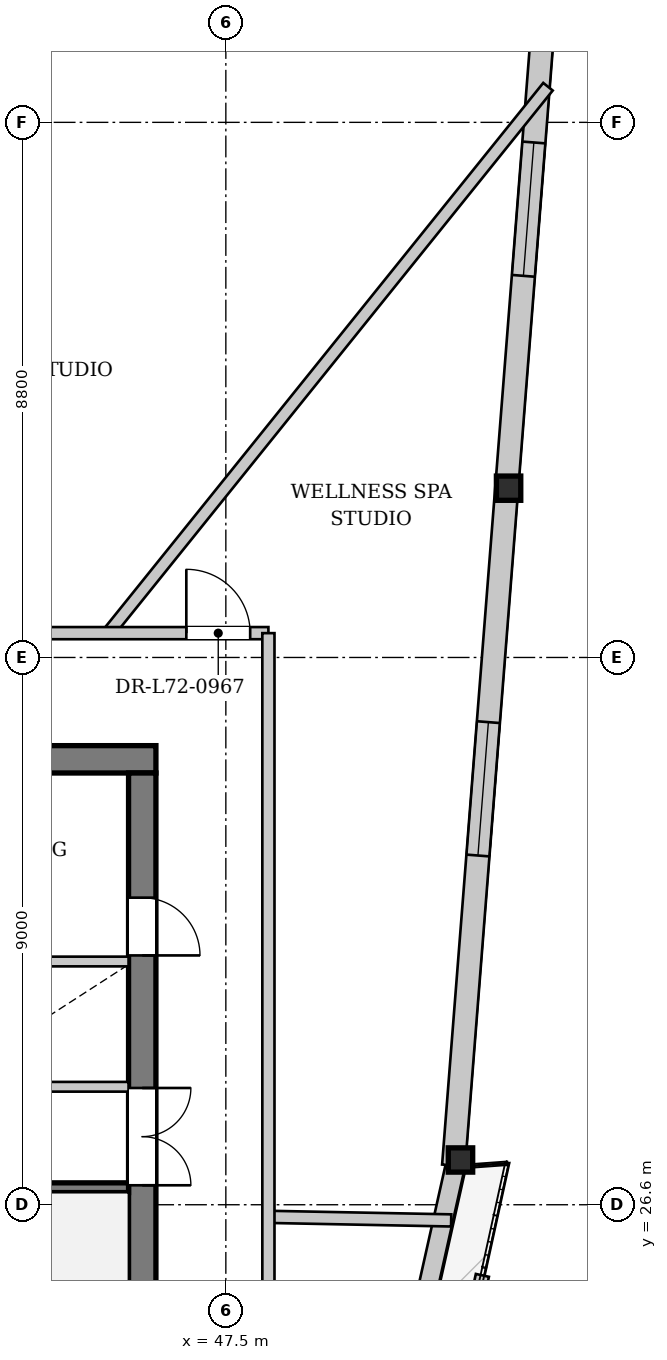
"""IFC4 building model, lengths in metres.
Left out: names, types, materials, properties, quantities, classifications, styles, units other than length and angle.
Written with IfcOpenShell. Run it as: python <this file> out.ifc"""

import sys

from ifc_helpers import new_model, si_unit, direction, frame, frame_2d, origin, origin_2d, place, context, subcontext, project, spatial, rectangle, i_section, extrude, source, transform, mapped, element, fill, save


model = new_model("IFC4")
c1 = context("Model", 3, precision=1e-05, world=origin(), true_north=direction((0.0, 1.0)))
c2 = subcontext(c1, "Body", "Model", "MODEL_VIEW")
j1 = project(units=[si_unit("LENGTHUNIT", "METRE"), si_unit("PLANEANGLEUNIT", "RADIAN")], contexts=[c1])
p1 = place(None, origin())
s1 = spatial("IfcSite", under=j1, at=p1, CompositionType="ELEMENT")
p2 = place(p1, origin())
s2 = spatial("IfcBuilding", under=s1, at=p2, CompositionType="ELEMENT")
p3 = place(p2, frame((0.0, 0.0, 270.5)))
s3 = spatial("IfcBuildingStorey", under=s2, at=p3, CompositionType="ELEMENT", Elevation=270.5)
m1 = source(origin(), c2, "Body", "SweptSolid", [
    extrude(i_section(OverallWidth=0.401, OverallDepth=0.399, WebThickness=0.022, FlangeThickness=0.034, at=origin_2d()), origin(), (0.0, 0.0, 1.0), 3.445),
])
p4 = place(p3, frame((51.436, 27.231, 0.0), z_axis=(-0.044436144626, 0.060878226848, 0.997155589939), x_axis=(-0.807718335097, -0.589568563569, 0.0)))
e1 = element("IfcColumn", 1, at=p4, inside=s3, PredefinedType="COLUMN", context=c2, shape_type="MappedRepresentation", body=[
    mapped(m1, transform((0.0, 0.0, 0.0), x_axis=(1.0, 0.0, 0.0), y_axis=(0.0, 1.0, 0.0), z_axis=(0.0, 0.0, 1.0), scale=1.0)),
])
m2 = source(origin(), c2, "Body", "SweptSolid", [
    extrude(i_section(OverallWidth=0.401, OverallDepth=0.399, WebThickness=0.022, FlangeThickness=0.034, at=origin_2d()), origin(), (0.0, 0.0, 1.0), 3.454),
])
p5 = place(p3, frame((52.303, 38.291, 0.0), z_axis=(-0.088644016049, 0.05407709113, 0.994594342752), x_axis=(-0.520788970814, -0.853685450197, 0.0)))
e2 = element("IfcColumn", 2, at=p5, inside=s3, PredefinedType="COLUMN", context=c2, shape_type="MappedRepresentation", body=[
    mapped(m2, transform((0.0, 0.0, 0.0), x_axis=(1.0, 0.0, 0.0), y_axis=(0.0, 1.0, 0.0), z_axis=(0.0, 0.0, 1.0), scale=1.0)),
])
p6 = place(p3, frame((51.28, 27.266, 0.0), z_axis=(0.0, 0.0, 1.0), x_axis=(-0.218426207381, -0.975853468472, 0.0)))
e3 = element("IfcWall", 3, at=p6, inside=s3, PredefinedType="SOLIDWALL", context=c2, shape_type="SweptSolid", body=[
    extrude(rectangle(XDim=22.187, YDim=0.32, at=frame_2d((11.093, 0.0))), origin(), (0.0, 0.0, 1.0), 2.872),
])
p7 = place(p6, frame((6.35, 0.0, 0.0)))
e4 = element("IfcOpeningElement", 4, at=p7, cuts=e3, PredefinedType="OPENING", context=c2, shape_type="SweptSolid", body=[
    extrude(rectangle(XDim=1.5, YDim=2.3, at=frame_2d((0.75, 1.15))), frame((0.0, 0.17, 0.0), z_axis=(0.0, -1.0, 0.0), x_axis=(1.0, 0.0, 0.0)), (0.0, 0.0, 1.0), 0.34),
])
p8 = place(p6, frame((15.568, 0.0, 0.402)))
e5 = element("IfcOpeningElement", 5, at=p8, cuts=e3, PredefinedType="OPENING", context=c2, shape_type="SweptSolid", body=[
    extrude(rectangle(XDim=2.6, YDim=2.35, at=frame_2d((1.3, 1.175))), frame((0.0, 0.17, 0.0), z_axis=(0.0, -1.0, 0.0), x_axis=(1.0, 0.0, 0.0)), (0.0, 0.0, 1.0), 0.34),
])
p9 = place(p3, frame((33.057, 39.294, 0.0), z_axis=(0.0, 0.0, 1.0), x_axis=(0.866967626838, 0.49836445902, 0.0)))
e6 = element("IfcWall", 6, at=p9, inside=s3, PredefinedType="SOLIDWALL", context=c2, shape_type="SweptSolid", body=[
    extrude(rectangle(XDim=21.674, YDim=0.32, at=frame_2d((10.837, 0.0))), origin(), (0.0, 0.0, 1.0), 2.872),
])
p10 = place(p9, frame((6.186, 0.0, 0.0)))
e7 = element("IfcOpeningElement", 7, at=p10, cuts=e6, PredefinedType="OPENING", context=c2, shape_type="SweptSolid", body=[
    extrude(rectangle(XDim=1.5, YDim=2.3, at=frame_2d((0.75, 1.15))), frame((0.0, 0.17, 0.0), z_axis=(0.0, -1.0, 0.0), x_axis=(1.0, 0.0, 0.0)), (0.0, 0.0, 1.0), 0.34),
])
p11 = place(p9, frame((14.739, 0.0, 0.402)))
e8 = element("IfcOpeningElement", 8, at=p11, cuts=e6, PredefinedType="OPENING", context=c2, shape_type="SweptSolid", body=[
    extrude(rectangle(XDim=2.6, YDim=2.35, at=frame_2d((1.3, 1.175))), frame((0.0, 0.17, 0.0), z_axis=(0.0, -1.0, 0.0), x_axis=(1.0, 0.0, 0.0)), (0.0, 0.0, 1.0), 0.34),
])
p12 = place(p3, frame((52.981, 49.365, 0.0), z_axis=(0.0, 0.0, 1.0), x_axis=(-0.078193389746, -0.99693820962, 0.0)))
e9 = element("IfcWall", 9, at=p12, inside=s3, PredefinedType="SOLIDWALL", context=c2, shape_type="SweptSolid", body=[
    extrude(rectangle(XDim=22.187, YDim=0.38, at=frame_2d((11.093, 0.0))), origin(), (0.0, 0.0, 1.0), 2.872),
])
p13 = place(p12, frame((5.312, 0.0, 0.502)))
e10 = element("IfcOpeningElement", 10, at=p13, cuts=e9, PredefinedType="OPENING", context=c2, shape_type="SweptSolid", body=[
    extrude(rectangle(XDim=2.2, YDim=2.25, at=frame_2d((1.1, 1.125))), frame((0.0, 0.2, 0.0), z_axis=(0.0, -1.0, 0.0), x_axis=(1.0, 0.0, 0.0)), (0.0, 0.0, 1.0), 0.4),
])
p14 = place(p12, frame((14.874, 0.0, 0.502)))
e11 = element("IfcOpeningElement", 11, at=p14, cuts=e9, PredefinedType="OPENING", context=c2, shape_type="SweptSolid", body=[
    extrude(rectangle(XDim=2.2, YDim=2.25, at=frame_2d((1.1, 1.125))), frame((0.0, 0.2, 0.0), z_axis=(0.0, -1.0, 0.0), x_axis=(1.0, 0.0, 0.0)), (0.0, 0.0, 1.0), 0.4),
])
p15 = place(p3, frame((51.071, 50.744, 0.0), z_axis=(0.0, 0.0, 1.0), x_axis=(-0.864808735234, -0.502101435433, 0.0)))
e12 = element("IfcWall", 12, at=p15, inside=s3, PredefinedType="PARAPET", context=c2, shape_type="SweptSolid", body=[
    extrude(rectangle(XDim=19.355, YDim=0.22, at=frame_2d((9.678, 0.0))), origin(), (0.0, 0.0, 1.0), 0.3),
])
p16 = place(p3, frame((47.473, 6.088, 0.0), z_axis=(0.0, 0.0, 1.0), x_axis=(0.214309508329, 0.976765803373, 0.0)))
e13 = element("IfcWall", 13, at=p16, inside=s3, PredefinedType="PARAPET", context=c2, shape_type="SweptSolid", body=[
    extrude(rectangle(XDim=19.811, YDim=0.22, at=frame_2d((9.905, 0.0))), origin(), (0.0, 0.0, 1.0), 0.3),
])
p17 = place(p3, frame((29.65, 33.925, 0.0), z_axis=(0.0, 0.0, 1.0), x_axis=(1.0, 0.0, 0.0)))
e14 = element("IfcWall", 14, at=p17, inside=s3, PredefinedType="SHEAR", context=c2, shape_type="SweptSolid", body=[
    extrude(rectangle(XDim=16.7, YDim=0.45, at=frame_2d((8.35, 0.0))), origin(), (0.0, 0.0, 1.0), 3.38),
])
p18 = place(p17, frame((1.45, 0.0, 0.0)))
e15 = element("IfcOpeningElement", 15, at=p18, cuts=e14, PredefinedType="OPENING", context=c2, shape_type="SweptSolid", body=[
    extrude(rectangle(XDim=0.95, YDim=2.1, at=frame_2d((0.475, 1.05))), frame((0.0, 0.235, 0.0), z_axis=(0.0, -1.0, 0.0), x_axis=(1.0, 0.0, 0.0)), (0.0, 0.0, 1.0), 0.47),
])
p19 = place(p17, frame((3.83, 0.0, 0.0)))
e16 = element("IfcOpeningElement", 16, at=p19, cuts=e14, PredefinedType="OPENING", context=c2, shape_type="SweptSolid", body=[
    extrude(rectangle(XDim=1.32, YDim=2.2, at=frame_2d((0.66, 1.1))), frame((0.0, 0.235, 0.0), z_axis=(0.0, -1.0, 0.0), x_axis=(1.0, 0.0, 0.0)), (0.0, 0.0, 1.0), 0.47),
])
p20 = place(p3, frame((46.125, 33.7, 0.0), z_axis=(0.0, 0.0, 1.0), x_axis=(0.0, -1.0, 0.0)))
e17 = element("IfcWall", 17, at=p20, inside=s3, PredefinedType="SHEAR", context=c2, shape_type="SweptSolid", body=[
    extrude(rectangle(XDim=14.2, YDim=0.45, at=frame_2d((7.1, 0.0))), origin(), (0.0, 0.0, 1.0), 3.38),
])
p21 = place(p20, frame((5.18, 0.0, 0.0)))
e18 = element("IfcOpeningElement", 18, at=p21, cuts=e17, PredefinedType="OPENING", context=c2, shape_type="SweptSolid", body=[
    extrude(rectangle(XDim=1.6, YDim=2.2, at=frame_2d((0.8, 1.1))), frame((0.0, 0.235, 0.0), z_axis=(0.0, -1.0, 0.0), x_axis=(1.0, 0.0, 0.0)), (0.0, 0.0, 1.0), 0.47),
])
p22 = place(p20, frame((2.05, 0.0, 0.0)))
e19 = element("IfcOpeningElement", 19, at=p22, cuts=e17, PredefinedType="OPENING", context=c2, shape_type="SweptSolid", body=[
    extrude(rectangle(XDim=0.95, YDim=2.1, at=frame_2d((0.475, 1.05))), frame((0.0, 0.235, 0.0), z_axis=(0.0, -1.0, 0.0), x_axis=(1.0, 0.0, 0.0)), (0.0, 0.0, 1.0), 0.47),
])
p23 = place(p3, frame((42.88, 26.88, 0.0), z_axis=(0.0, 0.0, 1.0), x_axis=(1.0, 0.0, 0.0)))
e20 = element("IfcWall", 20, at=p23, inside=s3, PredefinedType="PARTITIONING", context=c2, shape_type="SweptSolid", body=[
    extrude(rectangle(XDim=3.02, YDim=0.16, at=frame_2d((1.51, 0.0))), origin(), (0.0, 0.0, 1.0), 3.38),
])
p24 = place(p3, frame((33.28, 28.54, 0.0), z_axis=(0.0, 0.0, 1.0), x_axis=(1.0, 0.0, 0.0)))
e21 = element("IfcWall", 21, at=p24, inside=s3, PredefinedType="PARTITIONING", context=c2, shape_type="SweptSolid", body=[
    extrude(rectangle(XDim=12.62, YDim=0.16, at=frame_2d((6.31, 0.0))), origin(), (0.0, 0.0, 1.0), 3.38),
])
p25 = place(p24, frame((0.26, 0.0, 0.0)))
e22 = element("IfcOpeningElement", 22, at=p25, cuts=e21, PredefinedType="OPENING", context=c2, shape_type="SweptSolid", body=[
    extrude(rectangle(XDim=1.1, YDim=2.2, at=frame_2d((0.55, 1.1))), frame((0.0, 0.09, 0.0), z_axis=(0.0, -1.0, 0.0), x_axis=(1.0, 0.0, 0.0)), (0.0, 0.0, 1.0), 0.18),
])
p26 = place(p24, frame((2.01, 0.0, 0.0)))
e23 = element("IfcOpeningElement", 23, at=p26, cuts=e21, PredefinedType="OPENING", context=c2, shape_type="SweptSolid", body=[
    extrude(rectangle(XDim=1.1, YDim=2.2, at=frame_2d((0.55, 1.1))), frame((0.0, 0.09, 0.0), z_axis=(0.0, -1.0, 0.0), x_axis=(1.0, 0.0, 0.0)), (0.0, 0.0, 1.0), 0.18),
])
p27 = place(p24, frame((3.76, 0.0, 0.0)))
e24 = element("IfcOpeningElement", 24, at=p27, cuts=e21, PredefinedType="OPENING", context=c2, shape_type="SweptSolid", body=[
    extrude(rectangle(XDim=1.1, YDim=2.2, at=frame_2d((0.55, 1.1))), frame((0.0, 0.09, 0.0), z_axis=(0.0, -1.0, 0.0), x_axis=(1.0, 0.0, 0.0)), (0.0, 0.0, 1.0), 0.18),
])
p28 = place(p3, frame((40.72, 30.6, 0.0), z_axis=(0.0, 0.0, 1.0), x_axis=(1.0, 0.0, 0.0)))
e25 = element("IfcWall", 25, at=p28, inside=s3, PredefinedType="PARTITIONING", context=c2, shape_type="SweptSolid", body=[
    extrude(rectangle(XDim=5.18, YDim=0.16, at=frame_2d((2.59, 0.0))), origin(), (0.0, 0.0, 1.0), 3.38),
])
p29 = place(p3, frame((48.2, 26.401, 0.0), z_axis=(0.0, 0.0, 1.0), x_axis=(0.999808476489, -0.019570650003, 0.0)))
e26 = element("IfcWall", 26, at=p29, inside=s3, PredefinedType="PARTITIONING", context=c2, shape_type="SweptSolid", body=[
    extrude(rectangle(XDim=3.006, YDim=0.2, at=frame_2d((1.503, 0.0))), origin(), (0.0, 0.0, 1.0), 3.38),
])
p30 = place(p3, frame((45.565, 36.0, 0.0), z_axis=(0.0, 0.0, 1.0), x_axis=(0.626997187815, 0.779021518619, 0.0)))
e27 = element("IfcWall", 27, at=p30, inside=s3, PredefinedType="PARTITIONING", context=c2, shape_type="SweptSolid", body=[
    extrude(rectangle(XDim=11.535, YDim=0.2, at=frame_2d((5.768, 0.0))), origin(), (0.0, 0.0, 1.0), 3.38),
])
p31 = place(p3, frame((43.4, 36.0, 0.0), z_axis=(0.0, 0.0, 1.0), x_axis=(1.0, 0.0, 0.0)))
e28 = element("IfcWall", 28, at=p31, inside=s3, PredefinedType="PARTITIONING", context=c2, shape_type="SweptSolid", body=[
    extrude(rectangle(XDim=4.8, YDim=0.2, at=frame_2d((2.4, 0.0))), origin(), (0.0, 0.0, 1.0), 3.38),
])
p32 = place(p31, frame((3.45, 0.0, 0.0)))
e29 = element("IfcOpeningElement", 29, at=p32, cuts=e28, PredefinedType="OPENING", context=c2, shape_type="SweptSolid", body=[
    extrude(rectangle(XDim=1.05, YDim=2.2, at=frame_2d((0.525, 1.1))), frame((0.0, 0.11, 0.0), z_axis=(0.0, -1.0, 0.0), x_axis=(1.0, 0.0, 0.0)), (0.0, 0.0, 1.0), 0.22),
])
p33 = place(p3, frame((48.2, 17.2, 0.0), z_axis=(0.0, 0.0, 1.0), x_axis=(0.0, 1.0, 0.0)))
e30 = element("IfcWall", 30, at=p33, inside=s3, PredefinedType="PARTITIONING", context=c2, shape_type="SweptSolid", body=[
    extrude(rectangle(XDim=18.8, YDim=0.2, at=frame_2d((9.4, 0.0))), origin(), (0.0, 0.0, 1.0), 3.125),
])
m3 = source(origin(), c2, "Body", "SweptSolid", [
    extrude(rectangle(XDim=2.2, YDim=2.25, at=frame_2d((1.1, 1.125))), frame((0.0, 0.03, 0.0), z_axis=(0.0, -1.0, 0.0), x_axis=(1.0, 0.0, 0.0)), (0.0, 0.0, 1.0), 0.06),
])
p34 = place(p13, origin())
e31 = element("IfcWindow", 31, at=p34, inside=s3, PartitioningType="SINGLE_PANEL", PredefinedType="WINDOW", context=c2, shape_type="MappedRepresentation", body=[
    mapped(m3, transform((0.0, 0.0, 0.0), x_axis=(1.0, 0.0, 0.0), y_axis=(0.0, 1.0, 0.0), z_axis=(0.0, 0.0, 1.0), scale=1.0)),
])
fill(e10, e31)
p35 = place(p14, origin())
e32 = element("IfcWindow", 32, at=p35, inside=s3, PartitioningType="SINGLE_PANEL", PredefinedType="WINDOW", context=c2, shape_type="MappedRepresentation", body=[
    mapped(m3, transform((0.0, 0.0, 0.0), x_axis=(1.0, 0.0, 0.0), y_axis=(0.0, 1.0, 0.0), z_axis=(0.0, 0.0, 1.0), scale=1.0)),
])
fill(e11, e32)
m4 = source(origin(), c2, "Body", "SweptSolid", [
    extrude(rectangle(XDim=1.6, YDim=2.2, at=frame_2d((0.8, 1.1))), frame((0.0, 0.025, 0.0), z_axis=(0.0, -1.0, 0.0), x_axis=(1.0, 0.0, 0.0)), (0.0, 0.0, 1.0), 0.05),
])
p36 = place(p21, origin())
e33 = element("IfcDoor", 33, at=p36, inside=s3, OperationType="DOUBLE_DOOR_SINGLE_SWING", PredefinedType="DOOR", context=c2, shape_type="MappedRepresentation", body=[
    mapped(m4, transform((0.0, 0.0, 0.0), x_axis=(1.0, 0.0, 0.0), y_axis=(0.0, 1.0, 0.0), z_axis=(0.0, 0.0, 1.0), scale=1.0)),
])
fill(e18, e33)
m5 = source(origin(), c2, "Body", "SweptSolid", [
    extrude(rectangle(XDim=0.95, YDim=2.1, at=frame_2d((0.475, 1.05))), frame((0.0, 0.025, 0.0), z_axis=(0.0, -1.0, 0.0), x_axis=(1.0, 0.0, 0.0)), (0.0, 0.0, 1.0), 0.05),
])
p37 = place(p22, origin())
e34 = element("IfcDoor", 34, at=p37, inside=s3, OperationType="SINGLE_SWING_RIGHT", PredefinedType="DOOR", context=c2, shape_type="MappedRepresentation", body=[
    mapped(m5, transform((0.0, 0.0, 0.0), x_axis=(1.0, 0.0, 0.0), y_axis=(0.0, 1.0, 0.0), z_axis=(0.0, 0.0, 1.0), scale=1.0)),
])
fill(e19, e34)
m6 = source(origin(), c2, "Body", "SweptSolid", [
    extrude(rectangle(XDim=1.05, YDim=2.2, at=frame_2d((0.525, 1.1))), frame((0.0, 0.025, 0.0), z_axis=(0.0, -1.0, 0.0), x_axis=(1.0, 0.0, 0.0)), (0.0, 0.0, 1.0), 0.05),
])
p38 = place(p32, origin())
e35 = element("IfcDoor", 35, at=p38, inside=s3, OperationType="SINGLE_SWING_LEFT", PredefinedType="DOOR", context=c2, shape_type="MappedRepresentation", body=[
    mapped(m6, transform((0.0, 0.0, 0.0), x_axis=(1.0, 0.0, 0.0), y_axis=(0.0, 1.0, 0.0), z_axis=(0.0, 0.0, 1.0), scale=1.0)),
])
fill(e29, e35)
save(model, sys.argv[1])
